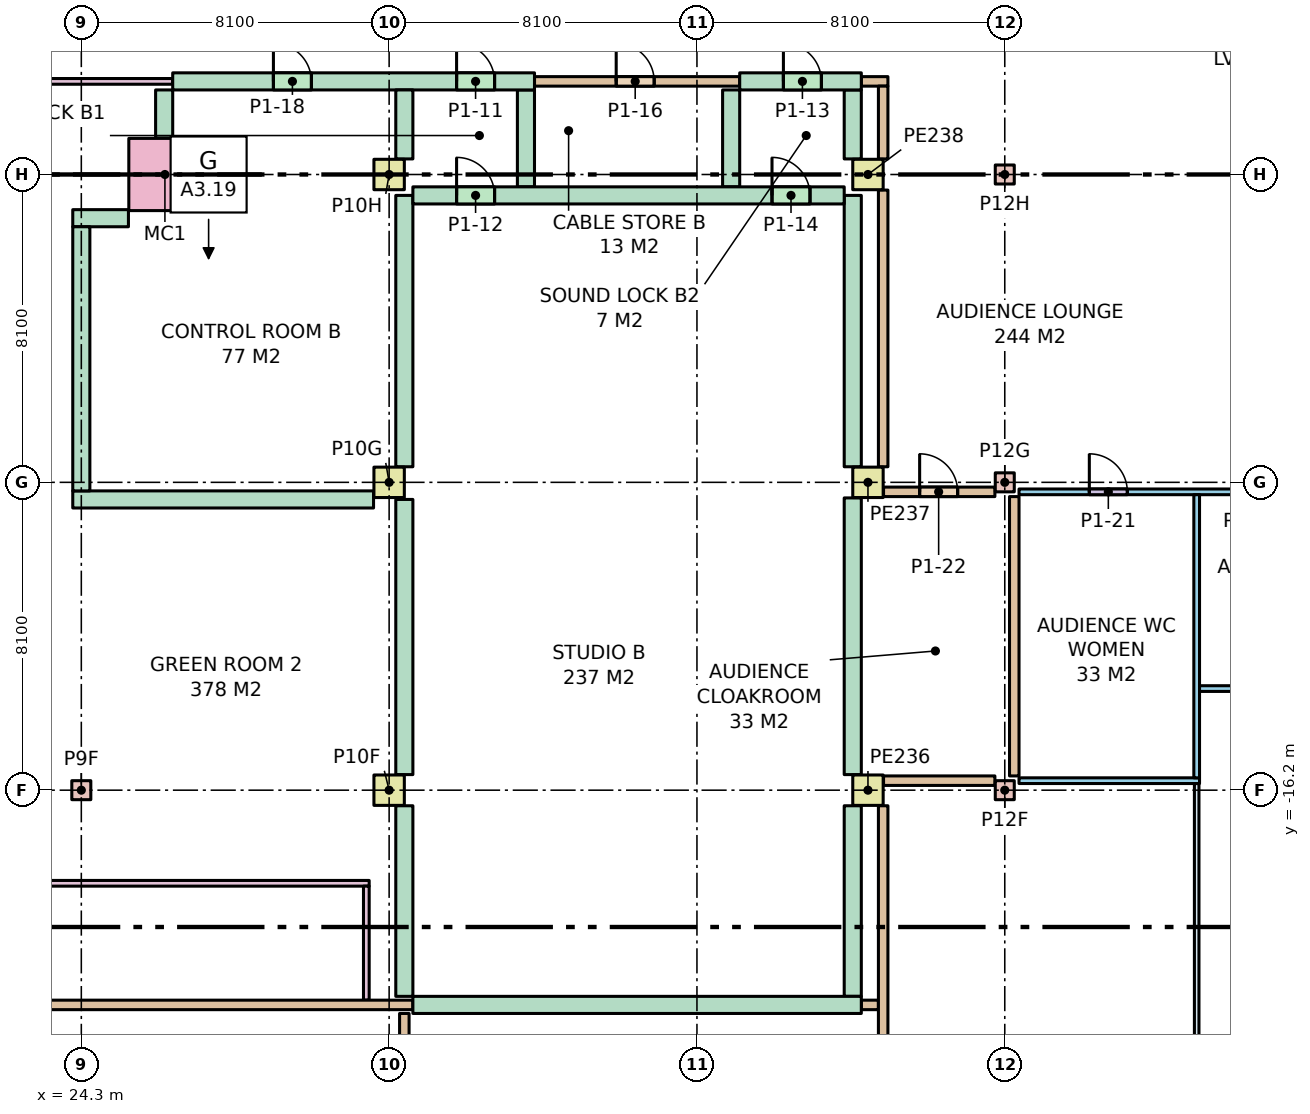
"""IFC4 building model, lengths in metres.
Left out: names, types, materials, properties, quantities, classifications, styles, units other than length and angle.
Written with IfcOpenShell. Run it as: python <this file> out.ifc"""

import sys

from ifc_helpers import new_model, si_unit, direction, frame, frame_2d, origin, origin_2d, place, context, subcontext, project, spatial, rectangle, extrude, element, fill, save


model = new_model("IFC4")
c1 = context("Model", 3, precision=1e-05, world=origin(), true_north=direction((0.0, 1.0)))
c2 = subcontext(c1, "Body", "Model", "MODEL_VIEW")
j1 = project(units=[si_unit("LENGTHUNIT", "METRE"), si_unit("PLANEANGLEUNIT", "RADIAN")], contexts=[c1])
p1 = place(None, origin())
s1 = spatial("IfcSite", under=j1, at=p1, CompositionType="ELEMENT")
p2 = place(p1, origin())
s2 = spatial("IfcBuilding", under=s1, at=p2, CompositionType="ELEMENT")
p3 = place(p2, frame((0.0, 0.0, 6.0)))
s3 = spatial("IfcBuildingStorey", under=s2, at=p3, CompositionType="ELEMENT", Elevation=6.0)
p4 = place(p3, frame((24.3, -16.2, 0.0), z_axis=(0.0, 0.0, 1.0), x_axis=(1.0, 0.0, 0.0)))
e1 = element("IfcColumn", 1, at=p4, inside=s3, PredefinedType="COLUMN", context=c2, shape_type="SweptSolid", body=[
    extrude(rectangle(XDim=0.5, YDim=0.5, at=origin_2d()), origin(), (0.0, 0.0, 1.0), 7.0),
])
for number, where, z_axis, x_axis in (
    (2, (32.4, -16.2, 0.0), (0.0, 0.0, 1.0), (1.0, 0.0, 0.0)),
    (3, (32.4, -8.1, 0.0), (0.0, 0.0, 1.0), (1.0, 0.0, 0.0)),
    (4, (32.4, 0.0, 0.0), (0.0, 0.0, 1.0), (1.0, 0.0, 0.0)),
):
    element("IfcColumn", number, at=place(p3, frame(where, z_axis=z_axis, x_axis=x_axis)), inside=s3, PredefinedType="COLUMN", context=c2, shape_type="SweptSolid", body=[
        extrude(rectangle(XDim=0.8, YDim=0.8, at=origin_2d()), origin(), (0.0, 0.0, 1.0), 7.0),
    ])
for number, where, z_axis, x_axis in (
    (5, (48.6, -16.2, 0.0), (0.0, 0.0, 1.0), (1.0, 0.0, 0.0)),
    (6, (48.6, -8.1, 0.0), (0.0, 0.0, 1.0), (1.0, 0.0, 0.0)),
    (7, (48.6, 0.0, 0.0), (0.0, 0.0, 1.0), (1.0, 0.0, 0.0)),
):
    element("IfcColumn", number, at=place(p3, frame(where, z_axis=z_axis, x_axis=x_axis)), inside=s3, PredefinedType="COLUMN", context=c2, shape_type="SweptSolid", body=[
        extrude(rectangle(XDim=0.5, YDim=0.5, at=origin_2d()), origin(), (0.0, 0.0, 1.0), 7.0),
    ])
for number, where, z_axis, x_axis in (
    (8, (45.0, -16.2, 0.0), (0.0, 0.0, 1.0), (1.0, 0.0, 0.0)),
    (9, (45.0, -8.1, 0.0), (0.0, 0.0, 1.0), (1.0, 0.0, 0.0)),
    (10, (45.0, 0.0, 0.0), (0.0, 0.0, 1.0), (1.0, 0.0, 0.0)),
):
    element("IfcColumn", number, at=place(p3, frame(where, z_axis=z_axis, x_axis=x_axis)), inside=s3, PredefinedType="COLUMN", context=c2, shape_type="SweptSolid", body=[
        extrude(rectangle(XDim=0.8, YDim=0.8, at=origin_2d()), origin(), (0.0, 0.0, 1.0), 7.0),
    ])
p5 = place(p3, frame((26.5, 0.0, 0.0), z_axis=(0.0, 0.0, 1.0), x_axis=(0.0, 1.0, 0.0)))
e11 = element("IfcColumn", 11, at=p5, inside=s3, PredefinedType="COLUMN", context=c2, shape_type="SweptSolid", body=[
    extrude(rectangle(XDim=1.9, YDim=1.9, at=origin_2d()), origin(), (0.0, 0.0, 1.0), 7.0),
])
p6 = place(p3, frame((48.85, -15.825, 0.0), z_axis=(0.0, 0.0, 1.0), x_axis=(0.0, 1.0, 0.0)))
e12 = element("IfcWall", 12, at=p6, inside=s3, PredefinedType="PARTITIONING", context=c2, shape_type="SweptSolid", body=[
    extrude(rectangle(XDim=7.35, YDim=0.25, at=frame_2d((3.675, 0.0))), origin(), (0.0, 0.0, 1.0), 6.68),
])
p7 = place(p3, frame((48.975, -8.35, 0.0), z_axis=(0.0, 0.0, 1.0), x_axis=(1.0, 0.0, 0.0)))
e13 = element("IfcWall", 13, at=p7, inside=s3, PredefinedType="PARTITIONING", context=c2, shape_type="SweptSolid", body=[
    extrude(rectangle(XDim=7.465, YDim=0.15, at=frame_2d((3.732, 0.0))), origin(), (0.0, 0.0, 1.0), 6.68),
])
p8 = place(p7, frame((1.85, 0.0, 0.0)))
e14 = element("IfcOpeningElement", 14, at=p8, cuts=e13, PredefinedType="OPENING", context=c2, shape_type="SweptSolid", body=[
    extrude(rectangle(XDim=1.0, YDim=2.1, at=frame_2d((0.5, 1.05))), frame((0.0, 0.085, 0.0), z_axis=(0.0, -1.0, 0.0), x_axis=(1.0, 0.0, 0.0)), (0.0, 0.0, 1.0), 0.17),
])
p9 = place(p7, frame((5.6, 0.0, 0.0)))
e15 = element("IfcOpeningElement", 15, at=p9, cuts=e13, PredefinedType="OPENING", context=c2, shape_type="SweptSolid", body=[
    extrude(rectangle(XDim=1.0, YDim=2.1, at=frame_2d((0.5, 1.05))), frame((0.0, 0.085, 0.0), z_axis=(0.0, -1.0, 0.0), x_axis=(1.0, 0.0, 0.0)), (0.0, 0.0, 1.0), 0.17),
])
p10 = place(p3, frame((48.975, -15.95, 0.0), z_axis=(0.0, 0.0, 1.0), x_axis=(1.0, 0.0, 0.0)))
e16 = element("IfcWall", 16, at=p10, inside=s3, PredefinedType="PARTITIONING", context=c2, shape_type="SweptSolid", body=[
    extrude(rectangle(XDim=4.75, YDim=0.15, at=frame_2d((2.375, 0.0))), origin(), (0.0, 0.0, 1.0), 6.68),
])
p11 = place(p3, frame((53.65, -15.875, 0.0), z_axis=(0.0, 0.0, 1.0), x_axis=(0.0, 1.0, 0.0)))
e17 = element("IfcWall", 17, at=p11, inside=s3, PredefinedType="PARTITIONING", context=c2, shape_type="SweptSolid", body=[
    extrude(rectangle(XDim=7.45, YDim=0.15, at=frame_2d((3.725, 0.0))), origin(), (0.0, 0.0, 1.0), 6.68),
])
p12 = place(p3, frame((53.725, -13.527, 0.0), z_axis=(0.0, 0.0, 1.0), x_axis=(1.0, 0.0, 0.0)))
e18 = element("IfcWall", 18, at=p12, inside=s3, PredefinedType="PARTITIONING", context=c2, shape_type="SweptSolid", body=[
    extrude(rectangle(XDim=4.05, YDim=0.15, at=frame_2d((2.025, 0.0))), origin(), (0.0, 0.0, 1.0), 6.68),
])
p13 = place(p3, frame((36.225, 2.45, 0.0), z_axis=(0.0, 0.0, 1.0), x_axis=(1.0, 0.0, 0.0)))
e19 = element("IfcWall", 19, at=p13, inside=s3, PredefinedType="PARTITIONING", context=c2, shape_type="SweptSolid", body=[
    extrude(rectangle(XDim=5.4, YDim=0.25, at=frame_2d((2.7, 0.0))), origin(), (0.0, 0.0, 1.0), 6.68),
])
p14 = place(p13, frame((2.15, 0.0, 0.0)))
e20 = element("IfcOpeningElement", 20, at=p14, cuts=e19, PredefinedType="OPENING", context=c2, shape_type="SweptSolid", body=[
    extrude(rectangle(XDim=1.0, YDim=2.1, at=frame_2d((0.5, 1.05))), frame((0.0, 0.135, 0.0), z_axis=(0.0, -1.0, 0.0), x_axis=(1.0, 0.0, 0.0)), (0.0, 0.0, 1.0), 0.27),
])
for number, where, z_axis, x_axis in (
    (21, (36.0, -0.325, 0.0), (0.0, 0.0, 1.0), (0.0, 1.0, 0.0)),
    (22, (41.4, -0.325, 0.0), (0.0, 0.0, 1.0), (0.0, 1.0, 0.0)),
):
    element("IfcWall", number, at=place(p3, frame(where, z_axis=z_axis, x_axis=x_axis)), inside=s3, PredefinedType="PARTITIONING", context=c2, shape_type="SweptSolid", body=[
        extrude(rectangle(XDim=2.55, YDim=0.45, at=frame_2d((1.275, 0.0))), origin(), (0.0, 0.0, 1.0), 6.68),
    ])
p15 = place(p3, frame((44.825, 2.45, 0.0), z_axis=(0.0, 0.0, 1.0), x_axis=(1.0, 0.0, 0.0)))
e23 = element("IfcWall", 23, at=p15, inside=s3, PredefinedType="PARTITIONING", context=c2, shape_type="SweptSolid", body=[
    extrude(rectangle(XDim=0.7, YDim=0.25, at=frame_2d((0.35, 0.0))), origin(), (0.0, 0.0, 1.0), 6.68),
])
p16 = place(p3, frame((44.6, 0.41, 0.0), z_axis=(0.0, 0.0, 1.0), x_axis=(0.0, 1.0, 0.0)))
e24 = element("IfcWall", 24, at=p16, inside=s3, PredefinedType="PARTITIONING", context=c2, shape_type="SweptSolid", body=[
    extrude(rectangle(XDim=1.815, YDim=0.45, at=frame_2d((0.908, 0.0))), origin(), (0.0, 0.0, 1.0), 6.68),
])
p17 = place(p3, frame((45.41, -8.35, 0.0), z_axis=(0.0, 0.0, 1.0), x_axis=(1.0, 0.0, 0.0)))
e25 = element("IfcWall", 25, at=p17, inside=s3, PredefinedType="PARTITIONING", context=c2, shape_type="SweptSolid", body=[
    extrude(rectangle(XDim=2.93, YDim=0.25, at=frame_2d((1.465, 0.0))), origin(), (0.0, 0.0, 1.0), 6.68),
])
p18 = place(p17, frame((0.95, 0.0, 0.0)))
e26 = element("IfcOpeningElement", 26, at=p18, cuts=e25, PredefinedType="OPENING", context=c2, shape_type="SweptSolid", body=[
    extrude(rectangle(XDim=1.0, YDim=2.1, at=frame_2d((0.5, 1.05))), frame((0.0, 0.135, 0.0), z_axis=(0.0, -1.0, 0.0), x_axis=(1.0, 0.0, 0.0)), (0.0, 0.0, 1.0), 0.27),
])
p19 = place(p3, frame((45.4, -7.69, 0.0), z_axis=(0.0, 0.0, 1.0), x_axis=(0.0, 1.0, 0.0)))
e27 = element("IfcWall", 27, at=p19, inside=s3, PredefinedType="PARTITIONING", context=c2, shape_type="SweptSolid", body=[
    extrude(rectangle(XDim=7.28, YDim=0.25, at=frame_2d((3.64, 0.0))), origin(), (0.0, 0.0, 1.0), 6.68),
])
p20 = place(p3, frame((45.4, 0.41, 0.0), z_axis=(0.0, 0.0, 1.0), x_axis=(0.0, 1.0, 0.0)))
e28 = element("IfcWall", 28, at=p20, inside=s3, PredefinedType="PARTITIONING", context=c2, shape_type="SweptSolid", body=[
    extrude(rectangle(XDim=1.915, YDim=0.25, at=frame_2d((0.958, 0.0))), origin(), (0.0, 0.0, 1.0), 6.68),
])
p21 = place(p3, frame((44.825, -21.85, 0.0), z_axis=(0.0, 0.0, 1.0), x_axis=(1.0, 0.0, 0.0)))
e29 = element("IfcWall", 29, at=p21, inside=s3, PredefinedType="PARTITIONING", context=c2, shape_type="SweptSolid", body=[
    extrude(rectangle(XDim=0.45, YDim=0.25, at=frame_2d((0.225, 0.0))), origin(), (0.0, 0.0, 1.0), 6.68),
])
p22 = place(p3, frame((44.6, -21.625, 0.0), z_axis=(0.0, 0.0, 1.0), x_axis=(0.0, 1.0, 0.0)))
e30 = element("IfcWall", 30, at=p22, inside=s3, PredefinedType="PARTITIONING", context=c2, shape_type="SweptSolid", body=[
    extrude(rectangle(XDim=5.015, YDim=0.45, at=frame_2d((2.507, 0.0))), origin(), (0.0, 0.0, 1.0), 6.68),
])
p23 = place(p3, frame((44.6, -15.79, 0.0), z_axis=(0.0, 0.0, 1.0), x_axis=(0.0, 1.0, 0.0)))
e31 = element("IfcWall", 31, at=p23, inside=s3, PredefinedType="PARTITIONING", context=c2, shape_type="SweptSolid", body=[
    extrude(rectangle(XDim=7.28, YDim=0.45, at=frame_2d((3.64, 0.0))), origin(), (0.0, 0.0, 1.0), 6.68),
])
p24 = place(p3, frame((44.6, -7.69, 0.0), z_axis=(0.0, 0.0, 1.0), x_axis=(0.0, 1.0, 0.0)))
e32 = element("IfcWall", 32, at=p24, inside=s3, PredefinedType="PARTITIONING", context=c2, shape_type="SweptSolid", body=[
    extrude(rectangle(XDim=7.14, YDim=0.45, at=frame_2d((3.57, 0.0))), origin(), (0.0, 0.0, 1.0), 6.68),
])
p25 = place(p3, frame((45.41, -15.95, 0.0), z_axis=(0.0, 0.0, 1.0), x_axis=(1.0, 0.0, 0.0)))
e33 = element("IfcWall", 33, at=p25, inside=s3, PredefinedType="PARTITIONING", context=c2, shape_type="SweptSolid", body=[
    extrude(rectangle(XDim=2.93, YDim=0.25, at=frame_2d((1.465, 0.0))), origin(), (0.0, 0.0, 1.0), 6.68),
])
p26 = place(p3, frame((26.705, 2.45, 0.0), z_axis=(0.0, 0.0, 1.0), x_axis=(1.0, 0.0, 0.0)))
e34 = element("IfcWall", 34, at=p26, inside=s3, PredefinedType="PARTITIONING", context=c2, shape_type="SweptSolid", body=[
    extrude(rectangle(XDim=9.52, YDim=0.45, at=frame_2d((4.76, 0.0))), origin(), (0.0, 0.0, 1.0), 6.68),
])
p27 = place(p26, frame((7.47, 0.0, 0.0)))
e35 = element("IfcOpeningElement", 35, at=p27, cuts=e34, PredefinedType="OPENING", context=c2, shape_type="SweptSolid", body=[
    extrude(rectangle(XDim=1.0, YDim=2.1, at=frame_2d((0.5, 1.05))), frame((0.0, 0.235, 0.0), z_axis=(0.0, -1.0, 0.0), x_axis=(1.0, 0.0, 0.0)), (0.0, 0.0, 1.0), 0.47),
])
p28 = place(p26, frame((2.65, 0.0, 0.0)))
e36 = element("IfcOpeningElement", 36, at=p28, cuts=e34, PredefinedType="OPENING", context=c2, shape_type="SweptSolid", body=[
    extrude(rectangle(XDim=1.0, YDim=2.1, at=frame_2d((0.5, 1.05))), frame((0.0, 0.235, 0.0), z_axis=(0.0, -1.0, 0.0), x_axis=(1.0, 0.0, 0.0)), (0.0, 0.0, 1.0), 0.47),
])
p29 = place(p3, frame((32.8, 0.41, 0.0), z_axis=(0.0, 0.0, 1.0), x_axis=(0.0, 1.0, 0.0)))
e37 = element("IfcWall", 37, at=p29, inside=s3, PredefinedType="PARTITIONING", context=c2, shape_type="SweptSolid", body=[
    extrude(rectangle(XDim=1.815, YDim=0.45, at=frame_2d((0.908, 0.0))), origin(), (0.0, 0.0, 1.0), 6.68),
])
p30 = place(p3, frame((24.075, -8.55, 0.0), z_axis=(0.0, 0.0, 1.0), x_axis=(1.0, 0.0, 0.0)))
e38 = element("IfcWall", 38, at=p30, inside=s3, PredefinedType="PARTITIONING", context=c2, shape_type="SweptSolid", body=[
    extrude(rectangle(XDim=7.915, YDim=0.45, at=frame_2d((3.958, 0.0))), origin(), (0.0, 0.0, 1.0), 6.68),
])
p31 = place(p3, frame((24.075, -1.15, 0.0), z_axis=(0.0, 0.0, 1.0), x_axis=(1.0, 0.0, 0.0)))
e39 = element("IfcWall", 39, at=p31, inside=s3, PredefinedType="PARTITIONING", context=c2, shape_type="SweptSolid", body=[
    extrude(rectangle(XDim=1.465, YDim=0.45, at=frame_2d((0.732, 0.0))), origin(), (0.0, 0.0, 1.0), 6.68),
])
p32 = place(p3, frame((24.3, -8.325, 0.0), z_axis=(0.0, 0.0, 1.0), x_axis=(0.0, 1.0, 0.0)))
e40 = element("IfcWall", 40, at=p32, inside=s3, PredefinedType="PARTITIONING", context=c2, shape_type="SweptSolid", body=[
    extrude(rectangle(XDim=6.95, YDim=0.45, at=frame_2d((3.475, 0.0))), origin(), (0.0, 0.0, 1.0), 6.68),
])
p33 = place(p3, frame((26.48, 0.96, 0.0), z_axis=(0.0, 0.0, 1.0), x_axis=(0.0, 1.0, 0.0)))
e41 = element("IfcWall", 41, at=p33, inside=s3, PredefinedType="PARTITIONING", context=c2, shape_type="SweptSolid", body=[
    extrude(rectangle(XDim=1.265, YDim=0.45, at=frame_2d((0.633, 0.0))), origin(), (0.0, 0.0, 1.0), 6.68),
])
p34 = place(p3, frame((32.8, -7.69, 0.0), z_axis=(0.0, 0.0, 1.0), x_axis=(0.0, 1.0, 0.0)))
e42 = element("IfcWall", 42, at=p34, inside=s3, PredefinedType="PARTITIONING", context=c2, shape_type="SweptSolid", body=[
    extrude(rectangle(XDim=7.14, YDim=0.45, at=frame_2d((3.57, 0.0))), origin(), (0.0, 0.0, 1.0), 6.68),
])
p35 = place(p3, frame((41.625, 2.45, 0.0), z_axis=(0.0, 0.0, 1.0), x_axis=(1.0, 0.0, 0.0)))
e43 = element("IfcWall", 43, at=p35, inside=s3, PredefinedType="PARTITIONING", context=c2, shape_type="SweptSolid", body=[
    extrude(rectangle(XDim=3.2, YDim=0.45, at=frame_2d((1.6, 0.0))), origin(), (0.0, 0.0, 1.0), 6.68),
])
p36 = place(p35, frame((1.15, 0.0, 0.0)))
e44 = element("IfcOpeningElement", 44, at=p36, cuts=e43, PredefinedType="OPENING", context=c2, shape_type="SweptSolid", body=[
    extrude(rectangle(XDim=1.0, YDim=2.1, at=frame_2d((0.5, 1.05))), frame((0.0, 0.235, 0.0), z_axis=(0.0, -1.0, 0.0), x_axis=(1.0, 0.0, 0.0)), (0.0, 0.0, 1.0), 0.47),
])
p37 = place(p3, frame((13.325, 2.45, 0.0), z_axis=(0.0, 0.0, 1.0), x_axis=(1.0, 0.0, 0.0)))
e45 = element("IfcWall", 45, at=p37, inside=s3, PredefinedType="PARTITIONING", context=c2, shape_type="SweptSolid", body=[
    extrude(rectangle(XDim=13.38, YDim=0.15, at=frame_2d((6.69, 0.0))), origin(), (0.0, 0.0, 1.0), 6.68),
])
p38 = place(p3, frame((33.025, -0.55, 0.0), z_axis=(0.0, 0.0, 1.0), x_axis=(1.0, 0.0, 0.0)))
e46 = element("IfcWall", 46, at=p38, inside=s3, PredefinedType="PARTITIONING", context=c2, shape_type="SweptSolid", body=[
    extrude(rectangle(XDim=11.35, YDim=0.45, at=frame_2d((5.675, 0.0))), origin(), (0.0, 0.0, 1.0), 6.68),
])
p39 = place(p38, frame((1.15, 0.0, 0.0)))
e47 = element("IfcOpeningElement", 47, at=p39, cuts=e46, PredefinedType="OPENING", context=c2, shape_type="SweptSolid", body=[
    extrude(rectangle(XDim=1.0, YDim=2.1, at=frame_2d((0.5, 1.05))), frame((0.0, 0.235, 0.0), z_axis=(0.0, -1.0, 0.0), x_axis=(1.0, 0.0, 0.0)), (0.0, 0.0, 1.0), 0.47),
])
p40 = place(p38, frame((9.45, 0.0, 0.0)))
e48 = element("IfcOpeningElement", 48, at=p40, cuts=e46, PredefinedType="OPENING", context=c2, shape_type="SweptSolid", body=[
    extrude(rectangle(XDim=1.0, YDim=2.1, at=frame_2d((0.5, 1.05))), frame((0.0, 0.235, 0.0), z_axis=(0.0, -1.0, 0.0), x_axis=(1.0, 0.0, 0.0)), (0.0, 0.0, 1.0), 0.47),
])
p41 = place(p3, frame((19.698, -18.65, 0.0), z_axis=(0.0, 0.0, 1.0), x_axis=(1.0, 0.0, 0.0)))
e49 = element("IfcWall", 49, at=p41, inside=s3, PredefinedType="PARTITIONING", context=c2, shape_type="SweptSolid", body=[
    extrude(rectangle(XDim=12.177, YDim=0.15, at=frame_2d((6.088, 0.0))), origin(), (0.0, 0.0, 1.0), 6.68),
])
p42 = place(p3, frame((31.8, -21.725, 0.0), z_axis=(0.0, 0.0, 1.0), x_axis=(0.0, 1.0, 0.0)))
e50 = element("IfcWall", 50, at=p42, inside=s3, PredefinedType="PARTITIONING", context=c2, shape_type="SweptSolid", body=[
    extrude(rectangle(XDim=3.0, YDim=0.15, at=frame_2d((1.5, 0.0))), origin(), (0.0, 0.0, 1.0), 6.68),
])
p43 = place(p3, frame((22.854, -21.85, 0.0), z_axis=(0.0, 0.0, 1.0), x_axis=(1.0, 0.0, 0.0)))
e51 = element("IfcWall", 51, at=p43, inside=s3, PredefinedType="PARTITIONING", context=c2, shape_type="SweptSolid", body=[
    extrude(rectangle(XDim=10.171, YDim=0.25, at=frame_2d((5.086, 0.0))), origin(), (0.0, 0.0, 1.0), 6.68),
])
p44 = place(p3, frame((33.025, -21.85, 0.0), z_axis=(0.0, 0.0, 1.0), x_axis=(1.0, 0.0, 0.0)))
e52 = element("IfcWall", 52, at=p44, inside=s3, PredefinedType="PARTITIONING", context=c2, shape_type="SweptSolid", body=[
    extrude(rectangle(XDim=11.8, YDim=0.45, at=frame_2d((5.9, 0.0))), origin(), (0.0, 0.0, 1.0), 6.68),
])
p45 = place(p3, frame((32.8, -23.89, 0.0), z_axis=(0.0, 0.0, 1.0), x_axis=(0.0, 1.0, 0.0)))
e53 = element("IfcWall", 53, at=p45, inside=s3, PredefinedType="PARTITIONING", context=c2, shape_type="SweptSolid", body=[
    extrude(rectangle(XDim=1.815, YDim=0.25, at=frame_2d((0.907, 0.0))), origin(), (0.0, 0.0, 1.0), 6.68),
])
p46 = place(p3, frame((45.4, -23.89, 0.0), z_axis=(0.0, 0.0, 1.0), x_axis=(0.0, 1.0, 0.0)))
e54 = element("IfcWall", 54, at=p46, inside=s3, PredefinedType="PARTITIONING", context=c2, shape_type="SweptSolid", body=[
    extrude(rectangle(XDim=7.28, YDim=0.25, at=frame_2d((3.64, 0.0))), origin(), (0.0, 0.0, 1.0), 6.68),
])
p47 = place(p3, frame((32.8, -21.625, 0.0), z_axis=(0.0, 0.0, 1.0), x_axis=(0.0, 1.0, 0.0)))
e55 = element("IfcWall", 55, at=p47, inside=s3, PredefinedType="PARTITIONING", context=c2, shape_type="SweptSolid", body=[
    extrude(rectangle(XDim=5.015, YDim=0.45, at=frame_2d((2.507, 0.0))), origin(), (0.0, 0.0, 1.0), 6.68),
])
p48 = place(p3, frame((32.8, -15.79, 0.0), z_axis=(0.0, 0.0, 1.0), x_axis=(0.0, 1.0, 0.0)))
e56 = element("IfcWall", 56, at=p48, inside=s3, PredefinedType="PARTITIONING", context=c2, shape_type="SweptSolid", body=[
    extrude(rectangle(XDim=7.24, YDim=0.45, at=frame_2d((3.62, 0.0))), origin(), (0.0, 0.0, 1.0), 6.68),
])
p49 = place(p3, frame((53.65, -34.575, 0.0), z_axis=(0.0, 0.0, 1.0), x_axis=(0.0, 1.0, 0.0)))
e57 = element("IfcWall", 57, at=p49, inside=s3, PredefinedType="PARTITIONING", context=c2, shape_type="SweptSolid", body=[
    extrude(rectangle(XDim=18.55, YDim=0.12, at=frame_2d((9.275, 0.0))), origin(), (0.0, 0.0, 1.0), 6.68),
])
p50 = place(p27, origin())
e58 = element("IfcDoor", 58, at=p50, inside=s3, OperationType="SINGLE_SWING_LEFT", PredefinedType="DOOR", context=c2, shape_type="SweptSolid", body=[
    extrude(rectangle(XDim=1.0, YDim=2.1, at=frame_2d((0.5, 1.05))), frame((0.0, 0.025, 0.0), z_axis=(0.0, -1.0, 0.0), x_axis=(1.0, 0.0, 0.0)), (0.0, 0.0, 1.0), 0.05),
])
fill(e35, e58)
p51 = place(p39, origin())
e59 = element("IfcDoor", 59, at=p51, inside=s3, OperationType="SINGLE_SWING_LEFT", PredefinedType="DOOR", context=c2, shape_type="SweptSolid", body=[
    extrude(rectangle(XDim=1.0, YDim=2.1, at=frame_2d((0.5, 1.05))), frame((0.0, 0.025, 0.0), z_axis=(0.0, -1.0, 0.0), x_axis=(1.0, 0.0, 0.0)), (0.0, 0.0, 1.0), 0.05),
])
fill(e47, e59)
p52 = place(p36, origin())
e60 = element("IfcDoor", 60, at=p52, inside=s3, OperationType="SINGLE_SWING_LEFT", PredefinedType="DOOR", context=c2, shape_type="SweptSolid", body=[
    extrude(rectangle(XDim=1.0, YDim=2.1, at=frame_2d((0.5, 1.05))), frame((0.0, 0.025, 0.0), z_axis=(0.0, -1.0, 0.0), x_axis=(1.0, 0.0, 0.0)), (0.0, 0.0, 1.0), 0.05),
])
fill(e44, e60)
p53 = place(p40, origin())
e61 = element("IfcDoor", 61, at=p53, inside=s3, OperationType="SINGLE_SWING_LEFT", PredefinedType="DOOR", context=c2, shape_type="SweptSolid", body=[
    extrude(rectangle(XDim=1.0, YDim=2.1, at=frame_2d((0.5, 1.05))), frame((0.0, 0.025, 0.0), z_axis=(0.0, -1.0, 0.0), x_axis=(1.0, 0.0, 0.0)), (0.0, 0.0, 1.0), 0.05),
])
fill(e48, e61)
p54 = place(p14, origin())
e62 = element("IfcDoor", 62, at=p54, inside=s3, OperationType="SINGLE_SWING_LEFT", PredefinedType="DOOR", context=c2, shape_type="SweptSolid", body=[
    extrude(rectangle(XDim=1.0, YDim=2.1, at=frame_2d((0.5, 1.05))), frame((0.0, 0.025, 0.0), z_axis=(0.0, -1.0, 0.0), x_axis=(1.0, 0.0, 0.0)), (0.0, 0.0, 1.0), 0.05),
])
fill(e20, e62)
p55 = place(p28, origin())
e63 = element("IfcDoor", 63, at=p55, inside=s3, OperationType="SINGLE_SWING_LEFT", PredefinedType="DOOR", context=c2, shape_type="SweptSolid", body=[
    extrude(rectangle(XDim=1.0, YDim=2.1, at=frame_2d((0.5, 1.05))), frame((0.0, 0.025, 0.0), z_axis=(0.0, -1.0, 0.0), x_axis=(1.0, 0.0, 0.0)), (0.0, 0.0, 1.0), 0.05),
])
fill(e36, e63)
p56 = place(p8, origin())
e64 = element("IfcDoor", 64, at=p56, inside=s3, OperationType="SINGLE_SWING_LEFT", PredefinedType="DOOR", context=c2, shape_type="SweptSolid", body=[
    extrude(rectangle(XDim=1.0, YDim=2.1, at=frame_2d((0.5, 1.05))), frame((0.0, 0.025, 0.0), z_axis=(0.0, -1.0, 0.0), x_axis=(1.0, 0.0, 0.0)), (0.0, 0.0, 1.0), 0.05),
])
fill(e14, e64)
p57 = place(p18, origin())
e65 = element("IfcDoor", 65, at=p57, inside=s3, OperationType="SINGLE_SWING_LEFT", PredefinedType="DOOR", context=c2, shape_type="SweptSolid", body=[
    extrude(rectangle(XDim=1.0, YDim=2.1, at=frame_2d((0.5, 1.05))), frame((0.0, 0.025, 0.0), z_axis=(0.0, -1.0, 0.0), x_axis=(1.0, 0.0, 0.0)), (0.0, 0.0, 1.0), 0.05),
])
fill(e26, e65)
save(model, sys.argv[1])
